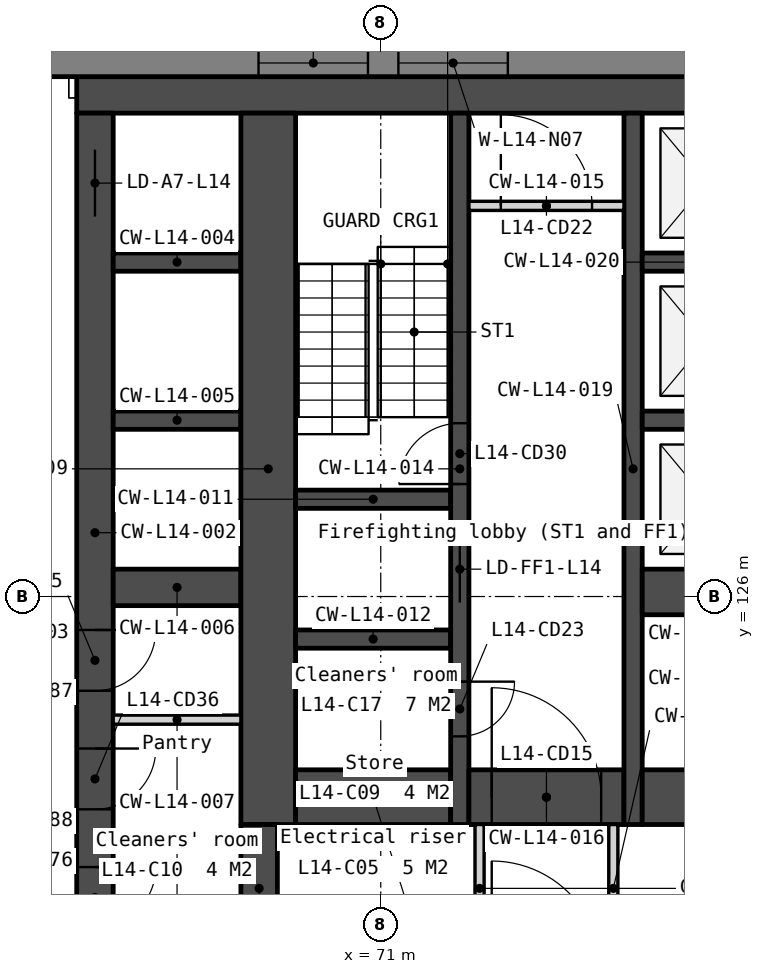
"""IFC4 building model, lengths in metres.
Left out: names, types, materials, properties, quantities, classifications, styles, units other than length and angle.
Written with IfcOpenShell. Run it as: python <this file> out.ifc"""

import sys

from ifc_helpers import new_model, si_unit, direction, frame, frame_2d, origin, place, context, subcontext, project, spatial, polyline, rectangle, outline, extrude, element, fill, save


model = new_model("IFC4")
c1 = context("Model", 3, precision=1e-05, world=origin(), true_north=direction((0.0, 1.0)))
c2 = subcontext(c1, "Body", "Model", "MODEL_VIEW")
j1 = project(units=[si_unit("LENGTHUNIT", "METRE"), si_unit("PLANEANGLEUNIT", "RADIAN")], contexts=[c1])
p1 = place(None, origin())
s1 = spatial("IfcSite", under=j1, at=p1, CompositionType="ELEMENT")
p2 = place(p1, origin())
s2 = spatial("IfcBuilding", under=s1, at=p2, CompositionType="ELEMENT")
p3 = place(p2, frame((0.0, 0.0, 63.0)))
s3 = spatial("IfcBuildingStorey", under=s2, at=p3, CompositionType="ELEMENT", Elevation=63.0)
p4 = place(p3, frame((66.0, 134.25, 0.0), z_axis=(0.0, 0.0, 1.0), x_axis=(1.0, 0.0, 0.0)))
e1 = element("IfcWall", 1, at=p4, inside=s3, PredefinedType="SOLIDWALL", context=c2, shape_type="SweptSolid", body=[
    extrude(rectangle(XDim=28.0, YDim=0.6, at=frame_2d((14.0, 0.0))), origin(), (0.0, 0.0, 1.0), 3.35),
])
p5 = place(p3, frame((66.3, 133.95, 0.0), z_axis=(0.0, 0.0, 1.0), x_axis=(0.0, -1.0, 0.0)))
e2 = element("IfcWall", 2, at=p5, inside=s3, PredefinedType="SOLIDWALL", context=c2, shape_type="SweptSolid", body=[
    extrude(rectangle(XDim=13.8, YDim=0.6, at=frame_2d((6.9, 0.0))), origin(), (0.0, 0.0, 1.0), 3.35),
])
p6 = place(p5, frame((0.6, 0.0, 0.0)))
e3 = element("IfcOpeningElement", 3, at=p6, cuts=e2, PredefinedType="OPENING", context=c2, shape_type="SweptSolid", body=[
    extrude(rectangle(XDim=1.1, YDim=2.1, at=frame_2d((0.55, 1.05))), frame((0.0, 0.31, 0.0), z_axis=(0.0, -1.0, 0.0), x_axis=(1.0, 0.0, 0.0)), (0.0, 0.0, 1.0), 0.62),
])
p7 = place(p5, frame((12.4, 0.0, 0.0)))
e4 = element("IfcOpeningElement", 4, at=p7, cuts=e2, PredefinedType="OPENING", context=c2, shape_type="SweptSolid", body=[
    extrude(rectangle(XDim=1.0, YDim=2.1, at=frame_2d((0.5, 1.05))), frame((0.0, 0.31, 0.0), z_axis=(0.0, -1.0, 0.0), x_axis=(1.0, 0.0, 0.0)), (0.0, 0.0, 1.0), 0.62),
])
p8 = place(p5, frame((8.5, 0.0, 0.0)))
e5 = element("IfcOpeningElement", 5, at=p8, cuts=e2, PredefinedType="OPENING", context=c2, shape_type="SweptSolid", body=[
    extrude(rectangle(XDim=1.0, YDim=2.1, at=frame_2d((0.5, 1.05))), frame((0.0, 0.31, 0.0), z_axis=(0.0, -1.0, 0.0), x_axis=(1.0, 0.0, 0.0)), (0.0, 0.0, 1.0), 0.62),
])
p9 = place(p5, frame((10.45, 0.0, 0.0)))
e6 = element("IfcOpeningElement", 6, at=p9, cuts=e2, PredefinedType="OPENING", context=c2, shape_type="SweptSolid", body=[
    extrude(rectangle(XDim=1.0, YDim=2.1, at=frame_2d((0.5, 1.05))), frame((0.0, 0.31, 0.0), z_axis=(0.0, -1.0, 0.0), x_axis=(1.0, 0.0, 0.0)), (0.0, 0.0, 1.0), 0.62),
])
for number, where, z_axis, x_axis in (
    (7, (66.6, 131.5, 0.0), (0.0, 0.0, 1.0), (1.0, 0.0, 0.0)),
    (8, (66.6, 128.9, 0.0), (0.0, 0.0, 1.0), (1.0, 0.0, 0.0)),
):
    element("IfcWall", number, at=place(p3, frame(where, z_axis=z_axis, x_axis=x_axis)), inside=s3, PredefinedType="SOLIDWALL", context=c2, shape_type="SweptSolid", body=[
        extrude(rectangle(XDim=2.1, YDim=0.3, at=frame_2d((1.05, 0.0))), origin(), (0.0, 0.0, 1.0), 3.35),
    ])
p10 = place(p3, frame((66.6, 126.15, 0.0), z_axis=(0.0, 0.0, 1.0), x_axis=(1.0, 0.0, 0.0)))
e9 = element("IfcWall", 9, at=p10, inside=s3, PredefinedType="SOLIDWALL", context=c2, shape_type="SweptSolid", body=[
    extrude(rectangle(XDim=2.1, YDim=0.6, at=frame_2d((1.05, 0.0))), origin(), (0.0, 0.0, 1.0), 3.35),
])
for number, where, z_axis, x_axis in (
    (10, (66.6, 123.975, 0.0), (0.0, 0.0, 1.0), (1.0, 0.0, 0.0)),
    (11, (66.6, 122.025, 0.0), (0.0, 0.0, 1.0), (1.0, 0.0, 0.0)),
):
    element("IfcWall", number, at=place(p3, frame(where, z_axis=z_axis, x_axis=x_axis)), inside=s3, PredefinedType="PARTITIONING", context=c2, shape_type="SweptSolid", body=[
        extrude(rectangle(XDim=2.1, YDim=0.15, at=frame_2d((1.05, 0.0))), origin(), (0.0, 0.0, 1.0), 3.35),
    ])
p11 = place(p3, frame((69.15, 133.95, 0.0), z_axis=(0.0, 0.0, 1.0), x_axis=(0.0, -1.0, 0.0)))
e12 = element("IfcWall", 12, at=p11, inside=s3, PredefinedType="SOLIDWALL", context=c2, shape_type="SweptSolid", body=[
    extrude(rectangle(XDim=11.7, YDim=0.9, at=frame_2d((5.85, 0.0))), origin(), (0.0, 0.0, 1.0), 3.35),
])
p12 = place(p3, frame((69.0, 122.25, 0.0), z_axis=(0.0, 0.0, 1.0), x_axis=(0.0, -1.0, 0.0)))
e13 = element("IfcWall", 13, at=p12, inside=s3, PredefinedType="SOLIDWALL", context=c2, shape_type="SweptSolid", body=[
    extrude(rectangle(XDim=2.1, YDim=0.6, at=frame_2d((1.05, 0.0))), origin(), (0.0, 0.0, 1.0), 3.35),
])
for number, where, z_axis, x_axis in (
    (14, (69.6, 127.6, 0.0), (0.0, 0.0, 1.0), (1.0, 0.0, 0.0)),
    (15, (69.6, 125.3, 0.0), (0.0, 0.0, 1.0), (1.0, 0.0, 0.0)),
):
    element("IfcWall", number, at=place(p3, frame(where, z_axis=z_axis, x_axis=x_axis)), inside=s3, PredefinedType="SOLIDWALL", context=c2, shape_type="SweptSolid", body=[
        extrude(rectangle(XDim=2.55, YDim=0.3, at=frame_2d((1.275, 0.0))), origin(), (0.0, 0.0, 1.0), 3.35),
    ])
p13 = place(p3, frame((69.6, 122.7, 0.0), z_axis=(0.0, 0.0, 1.0), x_axis=(1.0, 0.0, 0.0)))
e16 = element("IfcWall", 16, at=p13, inside=s3, PredefinedType="SOLIDWALL", context=c2, shape_type="SweptSolid", body=[
    extrude(rectangle(XDim=2.55, YDim=0.9, at=frame_2d((1.275, 0.0))), origin(), (0.0, 0.0, 1.0), 3.35),
])
p14 = place(p3, frame((72.3, 133.95, 0.0), z_axis=(0.0, 0.0, 1.0), x_axis=(0.0, -1.0, 0.0)))
e17 = element("IfcWall", 17, at=p14, inside=s3, PredefinedType="SOLIDWALL", context=c2, shape_type="SweptSolid", body=[
    extrude(rectangle(XDim=11.7, YDim=0.3, at=frame_2d((5.85, 0.0))), origin(), (0.0, 0.0, 1.0), 3.35),
])
p15 = place(p14, frame((6.95, 0.0, 0.0)))
e18 = element("IfcOpeningElement", 18, at=p15, cuts=e17, PredefinedType="OPENING", context=c2, shape_type="SweptSolid", body=[
    extrude(rectangle(XDim=1.1, YDim=2.1, at=frame_2d((0.55, 1.05))), frame((0.0, 0.16, 0.0), z_axis=(0.0, -1.0, 0.0), x_axis=(1.0, 0.0, 0.0)), (0.0, 0.0, 1.0), 0.32),
])
p16 = place(p14, frame((9.35, 0.0, 0.0)))
e19 = element("IfcOpeningElement", 19, at=p16, cuts=e17, PredefinedType="OPENING", context=c2, shape_type="SweptSolid", body=[
    extrude(rectangle(XDim=0.9, YDim=2.1, at=frame_2d((0.45, 1.05))), frame((0.0, 0.16, 0.0), z_axis=(0.0, -1.0, 0.0), x_axis=(1.0, 0.0, 0.0)), (0.0, 0.0, 1.0), 0.32),
])
p17 = place(p14, frame((5.1, 0.0, 0.0)))
e20 = element("IfcOpeningElement", 20, at=p17, cuts=e17, PredefinedType="OPENING", context=c2, shape_type="SweptSolid", body=[
    extrude(rectangle(XDim=1.0, YDim=2.1, at=frame_2d((0.5, 1.05))), frame((0.0, 0.16, 0.0), z_axis=(0.0, -1.0, 0.0), x_axis=(1.0, 0.0, 0.0)), (0.0, 0.0, 1.0), 0.32),
])
p18 = place(p3, frame((72.45, 132.425, 0.0), z_axis=(0.0, 0.0, 1.0), x_axis=(1.0, 0.0, 0.0)))
e21 = element("IfcWall", 21, at=p18, inside=s3, PredefinedType="PARTITIONING", context=c2, shape_type="SweptSolid", body=[
    extrude(rectangle(XDim=2.55, YDim=0.15, at=frame_2d((1.275, 0.0))), origin(), (0.0, 0.0, 1.0), 3.35),
])
p19 = place(p18, frame((0.525, 0.0, 0.0)))
e22 = element("IfcOpeningElement", 22, at=p19, cuts=e21, PredefinedType="OPENING", context=c2, shape_type="SweptSolid", body=[
    extrude(rectangle(XDim=1.5, YDim=2.1, at=frame_2d((0.75, 1.05))), frame((0.0, 0.085, 0.0), z_axis=(0.0, -1.0, 0.0), x_axis=(1.0, 0.0, 0.0)), (0.0, 0.0, 1.0), 0.17),
])
p20 = place(p3, frame((72.45, 122.7, 0.0), z_axis=(0.0, 0.0, 1.0), x_axis=(1.0, 0.0, 0.0)))
e23 = element("IfcWall", 23, at=p20, inside=s3, PredefinedType="SOLIDWALL", context=c2, shape_type="SweptSolid", body=[
    extrude(rectangle(XDim=2.55, YDim=0.9, at=frame_2d((1.275, 0.0))), origin(), (0.0, 0.0, 1.0), 3.35),
])
p21 = place(p20, frame((0.375, 0.0, 0.0)))
e24 = element("IfcOpeningElement", 24, at=p21, cuts=e23, PredefinedType="OPENING", context=c2, shape_type="SweptSolid", body=[
    extrude(rectangle(XDim=1.8, YDim=2.1, at=frame_2d((0.9, 1.05))), frame((0.0, 0.46, 0.0), z_axis=(0.0, -1.0, 0.0), x_axis=(1.0, 0.0, 0.0)), (0.0, 0.0, 1.0), 0.92),
])
for number, where, z_axis, x_axis in (
    (25, (72.625, 122.25, 0.0), (0.0, 0.0, 1.0), (0.0, -1.0, 0.0)),
    (26, (74.825, 122.25, 0.0), (0.0, 0.0, 1.0), (0.0, -1.0, 0.0)),
):
    element("IfcWall", number, at=place(p3, frame(where, z_axis=z_axis, x_axis=x_axis)), inside=s3, PredefinedType="PARTITIONING", context=c2, shape_type="SweptSolid", body=[
        extrude(rectangle(XDim=2.1, YDim=0.15, at=frame_2d((1.05, 0.0))), origin(), (0.0, 0.0, 1.0), 3.35),
    ])
p22 = place(p3, frame((75.15, 133.95, 0.0), z_axis=(0.0, 0.0, 1.0), x_axis=(0.0, -1.0, 0.0)))
e27 = element("IfcWall", 27, at=p22, inside=s3, PredefinedType="SOLIDWALL", context=c2, shape_type="SweptSolid", body=[
    extrude(rectangle(XDim=11.7, YDim=0.3, at=frame_2d((5.85, 0.0))), origin(), (0.0, 0.0, 1.0), 3.35),
])
for number, where, z_axis, x_axis in (
    (28, (75.3, 131.5, 0.0), (0.0, 0.0, 1.0), (1.0, 0.0, 0.0)),
    (29, (75.3, 128.9, 0.0), (0.0, 0.0, 1.0), (1.0, 0.0, 0.0)),
):
    element("IfcWall", number, at=place(p3, frame(where, z_axis=z_axis, x_axis=x_axis)), inside=s3, PredefinedType="SOLIDWALL", context=c2, shape_type="SweptSolid", body=[
        extrude(rectangle(XDim=2.1, YDim=0.3, at=frame_2d((1.05, 0.0))), origin(), (0.0, 0.0, 1.0), 3.35),
    ])
p23 = place(p3, frame((75.3, 126.075, 0.0), z_axis=(0.0, 0.0, 1.0), x_axis=(1.0, 0.0, 0.0)))
e30 = element("IfcWall", 30, at=p23, inside=s3, PredefinedType="SOLIDWALL", context=c2, shape_type="SweptSolid", body=[
    extrude(rectangle(XDim=2.1, YDim=0.75, at=frame_2d((1.05, 0.0))), origin(), (0.0, 0.0, 1.0), 3.35),
])
p24 = place(p3, frame((75.3, 122.7, 0.0), z_axis=(0.0, 0.0, 1.0), x_axis=(1.0, 0.0, 0.0)))
e31 = element("IfcWall", 31, at=p24, inside=s3, PredefinedType="SOLIDWALL", context=c2, shape_type="SweptSolid", body=[
    extrude(rectangle(XDim=6.2, YDim=0.9, at=frame_2d((3.1, 0.0))), origin(), (0.0, 0.0, 1.0), 3.35),
])
p25 = place(p3, frame((102.4, 134.775, -0.15), z_axis=(0.0, 0.0, 1.0), x_axis=(-1.0, 0.0, 0.0)))
e32 = element("IfcWall", 32, at=p25, inside=s3, PredefinedType="SOLIDWALL", context=c2, shape_type="SweptSolid", body=[
    extrude(outline(polyline([(44.8, 0.0), (44.8, 3.5), (0.0, 3.5), (0.0, 0.0), (44.8, 0.0)])), frame((0.0, 0.225, 0.0), z_axis=(0.0, -1.0, 0.0), x_axis=(1.0, 0.0, 0.0)), (0.0, 0.0, 1.0), 0.45),
])
p26 = place(p25, frame((2.43, 0.0, 1.05)))
e33 = element("IfcOpeningElement", 33, at=p26, cuts=e32, PredefinedType="OPENING", context=c2, shape_type="SweptSolid", body=[
    extrude(rectangle(XDim=1.8, YDim=1.5, at=frame_2d((0.9, 0.75))), frame((0.0, 0.235, 0.0), z_axis=(0.0, -1.0, 0.0), x_axis=(1.0, 0.0, 0.0)), (0.0, 0.0, 1.0), 0.47),
])
p27 = place(p25, frame((4.73, 0.0, 1.05)))
e34 = element("IfcOpeningElement", 34, at=p27, cuts=e32, PredefinedType="OPENING", context=c2, shape_type="SweptSolid", body=[
    extrude(rectangle(XDim=1.8, YDim=1.5, at=frame_2d((0.9, 0.75))), frame((0.0, 0.235, 0.0), z_axis=(0.0, -1.0, 0.0), x_axis=(1.0, 0.0, 0.0)), (0.0, 0.0, 1.0), 0.47),
])
p28 = place(p25, frame((11.39, 0.0, 1.05)))
e35 = element("IfcOpeningElement", 35, at=p28, cuts=e32, PredefinedType="OPENING", context=c2, shape_type="SweptSolid", body=[
    extrude(rectangle(XDim=1.8, YDim=1.5, at=frame_2d((0.9, 0.75))), frame((0.0, 0.235, 0.0), z_axis=(0.0, -1.0, 0.0), x_axis=(1.0, 0.0, 0.0)), (0.0, 0.0, 1.0), 0.47),
])
p29 = place(p25, frame((13.69, 0.0, 1.05)))
e36 = element("IfcOpeningElement", 36, at=p29, cuts=e32, PredefinedType="OPENING", context=c2, shape_type="SweptSolid", body=[
    extrude(rectangle(XDim=1.8, YDim=1.5, at=frame_2d((0.9, 0.75))), frame((0.0, 0.235, 0.0), z_axis=(0.0, -1.0, 0.0), x_axis=(1.0, 0.0, 0.0)), (0.0, 0.0, 1.0), 0.47),
])
p30 = place(p25, frame((20.35, 0.0, 1.05)))
e37 = element("IfcOpeningElement", 37, at=p30, cuts=e32, PredefinedType="OPENING", context=c2, shape_type="SweptSolid", body=[
    extrude(rectangle(XDim=1.8, YDim=1.5, at=frame_2d((0.9, 0.75))), frame((0.0, 0.235, 0.0), z_axis=(0.0, -1.0, 0.0), x_axis=(1.0, 0.0, 0.0)), (0.0, 0.0, 1.0), 0.47),
])
p31 = place(p25, frame((22.65, 0.0, 1.05)))
e38 = element("IfcOpeningElement", 38, at=p31, cuts=e32, PredefinedType="OPENING", context=c2, shape_type="SweptSolid", body=[
    extrude(rectangle(XDim=1.8, YDim=1.5, at=frame_2d((0.9, 0.75))), frame((0.0, 0.235, 0.0), z_axis=(0.0, -1.0, 0.0), x_axis=(1.0, 0.0, 0.0)), (0.0, 0.0, 1.0), 0.47),
])
p32 = place(p25, frame((29.31, 0.0, 1.05)))
e39 = element("IfcOpeningElement", 39, at=p32, cuts=e32, PredefinedType="OPENING", context=c2, shape_type="SweptSolid", body=[
    extrude(rectangle(XDim=1.8, YDim=1.5, at=frame_2d((0.9, 0.75))), frame((0.0, 0.235, 0.0), z_axis=(0.0, -1.0, 0.0), x_axis=(1.0, 0.0, 0.0)), (0.0, 0.0, 1.0), 0.47),
])
p33 = place(p25, frame((31.61, 0.0, 1.05)))
e40 = element("IfcOpeningElement", 40, at=p33, cuts=e32, PredefinedType="OPENING", context=c2, shape_type="SweptSolid", body=[
    extrude(rectangle(XDim=1.8, YDim=1.5, at=frame_2d((0.9, 0.75))), frame((0.0, 0.235, 0.0), z_axis=(0.0, -1.0, 0.0), x_axis=(1.0, 0.0, 0.0)), (0.0, 0.0, 1.0), 0.47),
])
p34 = place(p25, frame((38.27, 0.0, 1.05)))
e41 = element("IfcOpeningElement", 41, at=p34, cuts=e32, PredefinedType="OPENING", context=c2, shape_type="SweptSolid", body=[
    extrude(rectangle(XDim=1.8, YDim=1.5, at=frame_2d((0.9, 0.75))), frame((0.0, 0.235, 0.0), z_axis=(0.0, -1.0, 0.0), x_axis=(1.0, 0.0, 0.0)), (0.0, 0.0, 1.0), 0.47),
])
p35 = place(p25, frame((40.57, 0.0, 1.05)))
e42 = element("IfcOpeningElement", 42, at=p35, cuts=e32, PredefinedType="OPENING", context=c2, shape_type="SweptSolid", body=[
    extrude(rectangle(XDim=1.8, YDim=1.5, at=frame_2d((0.9, 0.75))), frame((0.0, 0.235, 0.0), z_axis=(0.0, -1.0, 0.0), x_axis=(1.0, 0.0, 0.0)), (0.0, 0.0, 1.0), 0.47),
])
p36 = place(p3, frame((54.495, 129.397, -0.15), z_axis=(0.0, 0.0, 1.0), x_axis=(0.499999201451, -0.866025864826, 0.0)))
e43 = element("IfcWall", 43, at=p36, inside=s3, PredefinedType="SOLIDWALL", context=c2, shape_type="SweptSolid", body=[
    extrude(outline(polyline([(44.8, 0.0), (44.8, 3.5), (0.0, 3.5), (0.0, 0.0), (44.8, 0.0)])), frame((0.0, 0.225, 0.0), z_axis=(0.0, -1.0, 0.0), x_axis=(1.0, 0.0, 0.0)), (0.0, 0.0, 1.0), 0.45),
])
p37 = place(p36, frame((2.43, 0.0, 1.05)))
e44 = element("IfcOpeningElement", 44, at=p37, cuts=e43, PredefinedType="OPENING", context=c2, shape_type="SweptSolid", body=[
    extrude(rectangle(XDim=1.8, YDim=1.5, at=frame_2d((0.9, 0.75))), frame((0.0, 0.235, 0.0), z_axis=(0.0, -1.0, 0.0), x_axis=(1.0, 0.0, 0.0)), (0.0, 0.0, 1.0), 0.47),
])
p38 = place(p36, frame((4.73, 0.0, 1.05)))
e45 = element("IfcOpeningElement", 45, at=p38, cuts=e43, PredefinedType="OPENING", context=c2, shape_type="SweptSolid", body=[
    extrude(rectangle(XDim=1.8, YDim=1.5, at=frame_2d((0.9, 0.75))), frame((0.0, 0.235, 0.0), z_axis=(0.0, -1.0, 0.0), x_axis=(1.0, 0.0, 0.0)), (0.0, 0.0, 1.0), 0.47),
])
p39 = place(p36, frame((11.39, 0.0, 1.05)))
e46 = element("IfcOpeningElement", 46, at=p39, cuts=e43, PredefinedType="OPENING", context=c2, shape_type="SweptSolid", body=[
    extrude(rectangle(XDim=1.8, YDim=1.5, at=frame_2d((0.9, 0.75))), frame((0.0, 0.235, 0.0), z_axis=(0.0, -1.0, 0.0), x_axis=(1.0, 0.0, 0.0)), (0.0, 0.0, 1.0), 0.47),
])
p40 = place(p36, frame((13.69, 0.0, 1.05)))
e47 = element("IfcOpeningElement", 47, at=p40, cuts=e43, PredefinedType="OPENING", context=c2, shape_type="SweptSolid", body=[
    extrude(rectangle(XDim=1.8, YDim=1.5, at=frame_2d((0.9, 0.75))), frame((0.0, 0.235, 0.0), z_axis=(0.0, -1.0, 0.0), x_axis=(1.0, 0.0, 0.0)), (0.0, 0.0, 1.0), 0.47),
])
p41 = place(p36, frame((20.35, 0.0, 1.05)))
e48 = element("IfcOpeningElement", 48, at=p41, cuts=e43, PredefinedType="OPENING", context=c2, shape_type="SweptSolid", body=[
    extrude(rectangle(XDim=1.8, YDim=1.5, at=frame_2d((0.9, 0.75))), frame((0.0, 0.235, 0.0), z_axis=(0.0, -1.0, 0.0), x_axis=(1.0, 0.0, 0.0)), (0.0, 0.0, 1.0), 0.47),
])
p42 = place(p36, frame((22.65, 0.0, 1.05)))
e49 = element("IfcOpeningElement", 49, at=p42, cuts=e43, PredefinedType="OPENING", context=c2, shape_type="SweptSolid", body=[
    extrude(rectangle(XDim=1.8, YDim=1.5, at=frame_2d((0.9, 0.75))), frame((0.0, 0.235, 0.0), z_axis=(0.0, -1.0, 0.0), x_axis=(1.0, 0.0, 0.0)), (0.0, 0.0, 1.0), 0.47),
])
p43 = place(p36, frame((29.31, 0.0, 1.05)))
e50 = element("IfcOpeningElement", 50, at=p43, cuts=e43, PredefinedType="OPENING", context=c2, shape_type="SweptSolid", body=[
    extrude(rectangle(XDim=1.8, YDim=1.5, at=frame_2d((0.9, 0.75))), frame((0.0, 0.235, 0.0), z_axis=(0.0, -1.0, 0.0), x_axis=(1.0, 0.0, 0.0)), (0.0, 0.0, 1.0), 0.47),
])
p44 = place(p36, frame((31.61, 0.0, 1.05)))
e51 = element("IfcOpeningElement", 51, at=p44, cuts=e43, PredefinedType="OPENING", context=c2, shape_type="SweptSolid", body=[
    extrude(rectangle(XDim=1.8, YDim=1.5, at=frame_2d((0.9, 0.75))), frame((0.0, 0.235, 0.0), z_axis=(0.0, -1.0, 0.0), x_axis=(1.0, 0.0, 0.0)), (0.0, 0.0, 1.0), 0.47),
])
p45 = place(p36, frame((38.27, 0.0, 1.05)))
e52 = element("IfcOpeningElement", 52, at=p45, cuts=e43, PredefinedType="OPENING", context=c2, shape_type="SweptSolid", body=[
    extrude(rectangle(XDim=1.8, YDim=1.5, at=frame_2d((0.9, 0.75))), frame((0.0, 0.235, 0.0), z_axis=(0.0, -1.0, 0.0), x_axis=(1.0, 0.0, 0.0)), (0.0, 0.0, 1.0), 0.47),
])
p46 = place(p36, frame((40.57, 0.0, 1.05)))
e53 = element("IfcOpeningElement", 53, at=p46, cuts=e43, PredefinedType="OPENING", context=c2, shape_type="SweptSolid", body=[
    extrude(rectangle(XDim=1.8, YDim=1.5, at=frame_2d((0.9, 0.75))), frame((0.0, 0.235, 0.0), z_axis=(0.0, -1.0, 0.0), x_axis=(1.0, 0.0, 0.0)), (0.0, 0.0, 1.0), 0.47),
])
p47 = place(p6, origin())
e54 = element("IfcDoor", 54, at=p47, inside=s3, OperationType="SLIDING_TO_LEFT", PredefinedType="DOOR", context=c2, shape_type="SweptSolid", body=[
    extrude(rectangle(XDim=1.1, YDim=2.1, at=frame_2d((0.55, 1.05))), frame((0.0, 0.025, 0.0), z_axis=(0.0, -1.0, 0.0), x_axis=(1.0, 0.0, 0.0)), (0.0, 0.0, 1.0), 0.05),
])
fill(e3, e54)
p48 = place(p15, origin())
e55 = element("IfcDoor", 55, at=p48, inside=s3, OperationType="SLIDING_TO_LEFT", PredefinedType="DOOR", context=c2, shape_type="SweptSolid", body=[
    extrude(rectangle(XDim=1.1, YDim=2.1, at=frame_2d((0.55, 1.05))), frame((0.0, 0.025, 0.0), z_axis=(0.0, -1.0, 0.0), x_axis=(1.0, 0.0, 0.0)), (0.0, 0.0, 1.0), 0.05),
])
fill(e18, e55)
p49 = place(p21, origin())
e56 = element("IfcDoor", 56, at=p49, inside=s3, OperationType="DOUBLE_DOOR_DOUBLE_SWING", PredefinedType="DOOR", context=c2, shape_type="SweptSolid", body=[
    extrude(rectangle(XDim=1.8, YDim=2.1, at=frame_2d((0.9, 1.05))), frame((0.0, 0.025, 0.0), z_axis=(0.0, -1.0, 0.0), x_axis=(1.0, 0.0, 0.0)), (0.0, 0.0, 1.0), 0.05),
])
fill(e24, e56)
p50 = place(p19, origin())
e57 = element("IfcDoor", 57, at=p50, inside=s3, OperationType="DOUBLE_DOOR_DOUBLE_SWING", PredefinedType="DOOR", context=c2, shape_type="SweptSolid", body=[
    extrude(rectangle(XDim=1.5, YDim=2.1, at=frame_2d((0.75, 1.05))), frame((0.0, 0.025, 0.0), z_axis=(0.0, -1.0, 0.0), x_axis=(1.0, 0.0, 0.0)), (0.0, 0.0, 1.0), 0.05),
])
fill(e22, e57)
p51 = place(p16, origin())
e58 = element("IfcDoor", 58, at=p51, inside=s3, OperationType="SINGLE_SWING_LEFT", PredefinedType="DOOR", context=c2, shape_type="SweptSolid", body=[
    extrude(rectangle(XDim=0.9, YDim=2.1, at=frame_2d((0.45, 1.05))), frame((0.0, 0.025, 0.0), z_axis=(0.0, -1.0, 0.0), x_axis=(1.0, 0.0, 0.0)), (0.0, 0.0, 1.0), 0.05),
])
fill(e19, e58)
p52 = place(p17, origin())
e59 = element("IfcDoor", 59, at=p52, inside=s3, OperationType="SINGLE_SWING_RIGHT", PredefinedType="DOOR", context=c2, shape_type="SweptSolid", body=[
    extrude(rectangle(XDim=1.0, YDim=2.1, at=frame_2d((0.5, 1.05))), frame((0.0, 0.025, 0.0), z_axis=(0.0, -1.0, 0.0), x_axis=(1.0, 0.0, 0.0)), (0.0, 0.0, 1.0), 0.05),
])
fill(e20, e59)
p53 = place(p7, origin())
e60 = element("IfcDoor", 60, at=p53, inside=s3, OperationType="SINGLE_SWING_LEFT", PredefinedType="DOOR", context=c2, shape_type="SweptSolid", body=[
    extrude(rectangle(XDim=1.0, YDim=2.1, at=frame_2d((0.5, 1.05))), frame((0.0, 0.025, 0.0), z_axis=(0.0, -1.0, 0.0), x_axis=(1.0, 0.0, 0.0)), (0.0, 0.0, 1.0), 0.05),
])
fill(e4, e60)
p54 = place(p8, origin())
e61 = element("IfcDoor", 61, at=p54, inside=s3, OperationType="SINGLE_SWING_LEFT", PredefinedType="DOOR", context=c2, shape_type="SweptSolid", body=[
    extrude(rectangle(XDim=1.0, YDim=2.1, at=frame_2d((0.5, 1.05))), frame((0.0, 0.025, 0.0), z_axis=(0.0, -1.0, 0.0), x_axis=(1.0, 0.0, 0.0)), (0.0, 0.0, 1.0), 0.05),
])
fill(e5, e61)
p55 = place(p9, origin())
e62 = element("IfcDoor", 62, at=p55, inside=s3, OperationType="SINGLE_SWING_LEFT", PredefinedType="DOOR", context=c2, shape_type="SweptSolid", body=[
    extrude(rectangle(XDim=1.0, YDim=2.1, at=frame_2d((0.5, 1.05))), frame((0.0, 0.025, 0.0), z_axis=(0.0, -1.0, 0.0), x_axis=(1.0, 0.0, 0.0)), (0.0, 0.0, 1.0), 0.05),
])
fill(e6, e62)
p56 = place(p32, origin())
e63 = element("IfcWindow", 63, at=p56, inside=s3, PartitioningType="SINGLE_PANEL", PredefinedType="WINDOW", context=c2, shape_type="SweptSolid", body=[
    extrude(rectangle(XDim=1.8, YDim=1.5, at=frame_2d((0.9, 0.75))), frame((0.0, 0.03, 0.0), z_axis=(0.0, -1.0, 0.0), x_axis=(1.0, 0.0, 0.0)), (0.0, 0.0, 1.0), 0.06),
])
fill(e39, e63)
p57 = place(p33, origin())
e64 = element("IfcWindow", 64, at=p57, inside=s3, PartitioningType="SINGLE_PANEL", PredefinedType="WINDOW", context=c2, shape_type="SweptSolid", body=[
    extrude(rectangle(XDim=1.8, YDim=1.5, at=frame_2d((0.9, 0.75))), frame((0.0, 0.03, 0.0), z_axis=(0.0, -1.0, 0.0), x_axis=(1.0, 0.0, 0.0)), (0.0, 0.0, 1.0), 0.06),
])
fill(e40, e64)
save(model, sys.argv[1])
